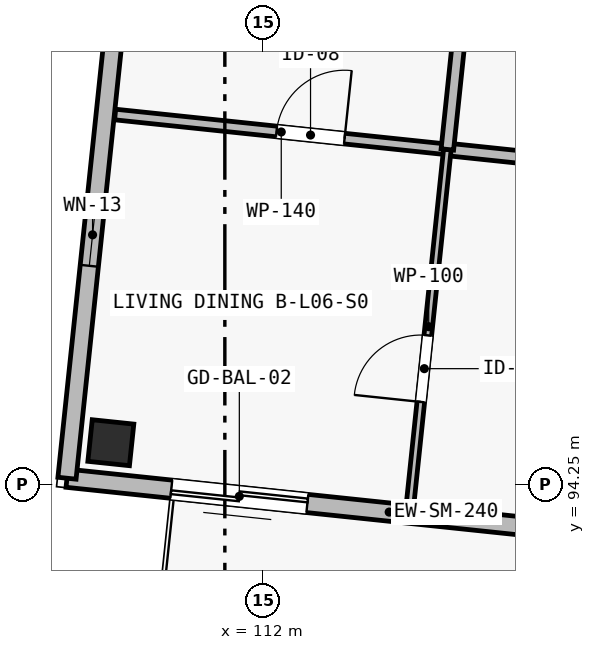
"""IFC4 building model, lengths in metres.
Left out: names, types, materials, properties, quantities, classifications, styles, units other than length and angle.
Written with IfcOpenShell. Run it as: python <this file> out.ifc"""

import sys

from ifc_helpers import new_model, si_unit, direction, frame, frame_2d, origin, origin_2d, place, context, subcontext, project, spatial, rectangle, extrude, element, fill, save


model = new_model("IFC4")
c1 = context("Model", 3, precision=1e-05, world=origin(), true_north=direction((0.0, 1.0)))
c2 = subcontext(c1, "Body", "Model", "MODEL_VIEW")
j1 = project(units=[si_unit("LENGTHUNIT", "METRE"), si_unit("PLANEANGLEUNIT", "RADIAN")], contexts=[c1])
p1 = place(None, origin())
s1 = spatial("IfcSite", under=j1, at=p1, CompositionType="ELEMENT")
p2 = place(p1, origin())
s2 = spatial("IfcBuilding", under=s1, at=p2, CompositionType="ELEMENT")
p3 = place(p2, frame((0.0, 0.0, 21.4)))
s3 = spatial("IfcBuildingStorey", under=s2, at=p3, CompositionType="ELEMENT", Elevation=21.4)
p4 = place(p3, frame((110.0, 94.8, 0.0), z_axis=(0.0, 0.0, 1.0), x_axis=(0.994521895368, -0.104528463268, 0.0)))
e1 = element("IfcColumn", 1, at=p4, inside=s3, PredefinedType="COLUMN", context=c2, shape_type="SweptSolid", body=[
    extrude(rectangle(XDim=0.55, YDim=0.55, at=origin_2d()), origin(), (0.0, 0.0, 1.0), 3.25),
])
p5 = place(p3, frame((117.901, 93.442, 0.0), z_axis=(0.0, 0.0, 1.0), x_axis=(-0.994521760736, 0.104529744196, 0.0)))
e2 = element("IfcWall", 2, at=p5, inside=s3, PredefinedType="SOLIDWALL", context=c2, shape_type="SweptSolid", body=[
    extrude(rectangle(XDim=8.525, YDim=0.24, at=frame_2d((4.262, 0.0))), origin(), (0.0, 0.0, 1.0), 3.0),
])
p6 = place(p5, frame((5.345, 0.0, 0.0)))
e3 = element("IfcOpeningElement", 3, at=p6, cuts=e2, PredefinedType="OPENING", context=c2, shape_type="SweptSolid", body=[
    extrude(rectangle(XDim=1.8, YDim=2.12, at=frame_2d((0.9, 1.06))), frame((0.0, 0.135, 0.0), z_axis=(0.0, -1.0, 0.0), x_axis=(1.0, 0.0, 0.0)), (0.0, 0.0, 1.0), 0.27),
])
p7 = place(p5, frame((0.83, 0.0, 0.42)))
e4 = element("IfcOpeningElement", 4, at=p7, cuts=e2, PredefinedType="OPENING", context=c2, shape_type="SweptSolid", body=[
    extrude(rectangle(XDim=0.7, YDim=2.36, at=frame_2d((0.35, 1.18))), frame((0.0, 0.135, 0.0), z_axis=(0.0, -1.0, 0.0), x_axis=(1.0, 0.0, 0.0)), (0.0, 0.0, 1.0), 0.27),
])
p8 = place(p3, frame((109.423, 94.333, 0.0), z_axis=(0.0, 0.0, 1.0), x_axis=(0.1045253859, 0.994522218808, 0.0)))
e5 = element("IfcWall", 5, at=p8, inside=s3, PredefinedType="SOLIDWALL", context=c2, shape_type="SweptSolid", body=[
    extrude(rectangle(XDim=20.65, YDim=0.24, at=frame_2d((10.325, 0.0))), origin(), (0.0, 0.0, 1.0), 3.0),
])
p9 = place(p8, frame((2.81, 0.0, 0.45)))
e6 = element("IfcOpeningElement", 6, at=p9, cuts=e5, PredefinedType="OPENING", context=c2, shape_type="SweptSolid", body=[
    extrude(rectangle(XDim=0.82, YDim=2.18, at=frame_2d((0.41, 1.09))), frame((0.0, 0.135, 0.0), z_axis=(0.0, -1.0, 0.0), x_axis=(1.0, 0.0, 0.0)), (0.0, 0.0, 1.0), 0.27),
])
p10 = place(p8, frame((17.18, 0.0, 0.52)))
e7 = element("IfcOpeningElement", 7, at=p10, cuts=e5, PredefinedType="OPENING", context=c2, shape_type="SweptSolid", body=[
    extrude(rectangle(XDim=0.66, YDim=2.32, at=frame_2d((0.33, 1.16))), frame((0.0, 0.135, 0.0), z_axis=(0.0, -1.0, 0.0), x_axis=(1.0, 0.0, 0.0)), (0.0, 0.0, 1.0), 0.27),
])
p11 = place(p3, frame((110.057, 99.118, 0.0), z_axis=(0.0, 0.0, 1.0), x_axis=(0.994525828039, -0.104491039633, 0.0)))
e8 = element("IfcWall", 8, at=p11, inside=s3, PredefinedType="PARTITIONING", context=c2, shape_type="SweptSolid", body=[
    extrude(rectangle(XDim=4.395, YDim=0.14, at=frame_2d((2.198, 0.0))), origin(), (0.0, 0.0, 1.0), 2.97),
])
p12 = place(p11, frame((2.135, 0.0, 0.0)))
e9 = element("IfcOpeningElement", 9, at=p12, cuts=e8, PredefinedType="OPENING", context=c2, shape_type="SweptSolid", body=[
    extrude(rectangle(XDim=0.9, YDim=2.1, at=frame_2d((0.45, 1.05))), frame((0.0, 0.085, 0.0), z_axis=(0.0, -1.0, 0.0), x_axis=(1.0, 0.0, 0.0)), (0.0, 0.0, 1.0), 0.17),
])
p13 = place(p3, frame((114.427, 98.658, 0.0), z_axis=(0.0, 0.0, 1.0), x_axis=(0.994517841934, -0.104567021925, 0.0)))
e10 = element("IfcWall", 10, at=p13, inside=s3, PredefinedType="PLUMBINGWALL", context=c2, shape_type="SweptSolid", body=[
    extrude(rectangle(XDim=3.885, YDim=0.165, at=frame_2d((1.942, 0.0))), origin(), (0.0, 0.0, 1.0), 2.97),
])
p14 = place(p13, frame((1.4, 0.0, 0.0)))
e11 = element("IfcOpeningElement", 11, at=p14, cuts=e10, PredefinedType="OPENING", context=c2, shape_type="SweptSolid", body=[
    extrude(rectangle(XDim=0.82, YDim=2.08, at=frame_2d((0.41, 1.04))), frame((0.0, 0.097, 0.0), z_axis=(0.0, -1.0, 0.0), x_axis=(1.0, 0.0, 0.0)), (0.0, 0.0, 1.0), 0.195),
])
p15 = place(p3, frame((113.937, 93.994, 0.0), z_axis=(0.0, 0.0, 1.0), x_axis=(0.104527618124, 0.994521984196, 0.0)))
e12 = element("IfcWall", 12, at=p15, inside=s3, PredefinedType="PARTITIONING", context=c2, shape_type="SweptSolid", body=[
    extrude(rectangle(XDim=4.69, YDim=0.1, at=frame_2d((2.345, 0.0))), origin(), (0.0, 0.0, 1.0), 2.97),
])
p16 = place(p15, frame((1.35, 0.0, 0.0)))
e13 = element("IfcOpeningElement", 13, at=p16, cuts=e12, PredefinedType="OPENING", context=c2, shape_type="SweptSolid", body=[
    extrude(rectangle(XDim=0.88, YDim=2.1, at=frame_2d((0.44, 1.05))), frame((0.0, 0.065, 0.0), z_axis=(0.0, -1.0, 0.0), x_axis=(1.0, 0.0, 0.0)), (0.0, 0.0, 1.0), 0.13),
])
p17 = place(p3, frame((114.427, 98.658, 0.0), z_axis=(0.0, 0.0, 1.0), x_axis=(0.104551541926, 0.994519469433, 0.0)))
e14 = element("IfcWall", 14, at=p17, inside=s3, PredefinedType="PLUMBINGWALL", context=c2, shape_type="SweptSolid", body=[
    extrude(rectangle(XDim=3.72, YDim=0.165, at=frame_2d((1.86, 0.0))), origin(), (0.0, 0.0, 1.0), 2.97),
])
p18 = place(p6, origin())
e15 = element("IfcDoor", 15, at=p18, inside=s3, OperationType="SLIDING_TO_LEFT", PredefinedType="DOOR", context=c2, shape_type="SweptSolid", body=[
    extrude(rectangle(XDim=1.8, YDim=2.12, at=frame_2d((0.9, 1.06))), frame((0.0, 0.025, 0.0), z_axis=(0.0, -1.0, 0.0), x_axis=(1.0, 0.0, 0.0)), (0.0, 0.0, 1.0), 0.05),
])
fill(e3, e15)
p19 = place(p9, origin())
e16 = element("IfcWindow", 16, at=p19, inside=s3, PartitioningType="SINGLE_PANEL", PredefinedType="WINDOW", context=c2, shape_type="SweptSolid", body=[
    extrude(rectangle(XDim=0.82, YDim=2.18, at=frame_2d((0.41, 1.09))), frame((0.0, 0.03, 0.0), z_axis=(0.0, -1.0, 0.0), x_axis=(1.0, 0.0, 0.0)), (0.0, 0.0, 1.0), 0.06),
])
fill(e6, e16)
p20 = place(p12, origin())
e17 = element("IfcDoor", 17, at=p20, inside=s3, OperationType="SINGLE_SWING_RIGHT", PredefinedType="DOOR", context=c2, shape_type="SweptSolid", body=[
    extrude(rectangle(XDim=0.9, YDim=2.1, at=frame_2d((0.45, 1.05))), frame((0.0, 0.025, 0.0), z_axis=(0.0, -1.0, 0.0), x_axis=(1.0, 0.0, 0.0)), (0.0, 0.0, 1.0), 0.05),
])
fill(e9, e17)
p21 = place(p16, origin())
e18 = element("IfcDoor", 18, at=p21, inside=s3, OperationType="SINGLE_SWING_LEFT", PredefinedType="DOOR", context=c2, shape_type="SweptSolid", body=[
    extrude(rectangle(XDim=0.88, YDim=2.1, at=frame_2d((0.44, 1.05))), frame((0.0, 0.025, 0.0), z_axis=(0.0, -1.0, 0.0), x_axis=(1.0, 0.0, 0.0)), (0.0, 0.0, 1.0), 0.05),
])
fill(e13, e18)
save(model, sys.argv[1])
